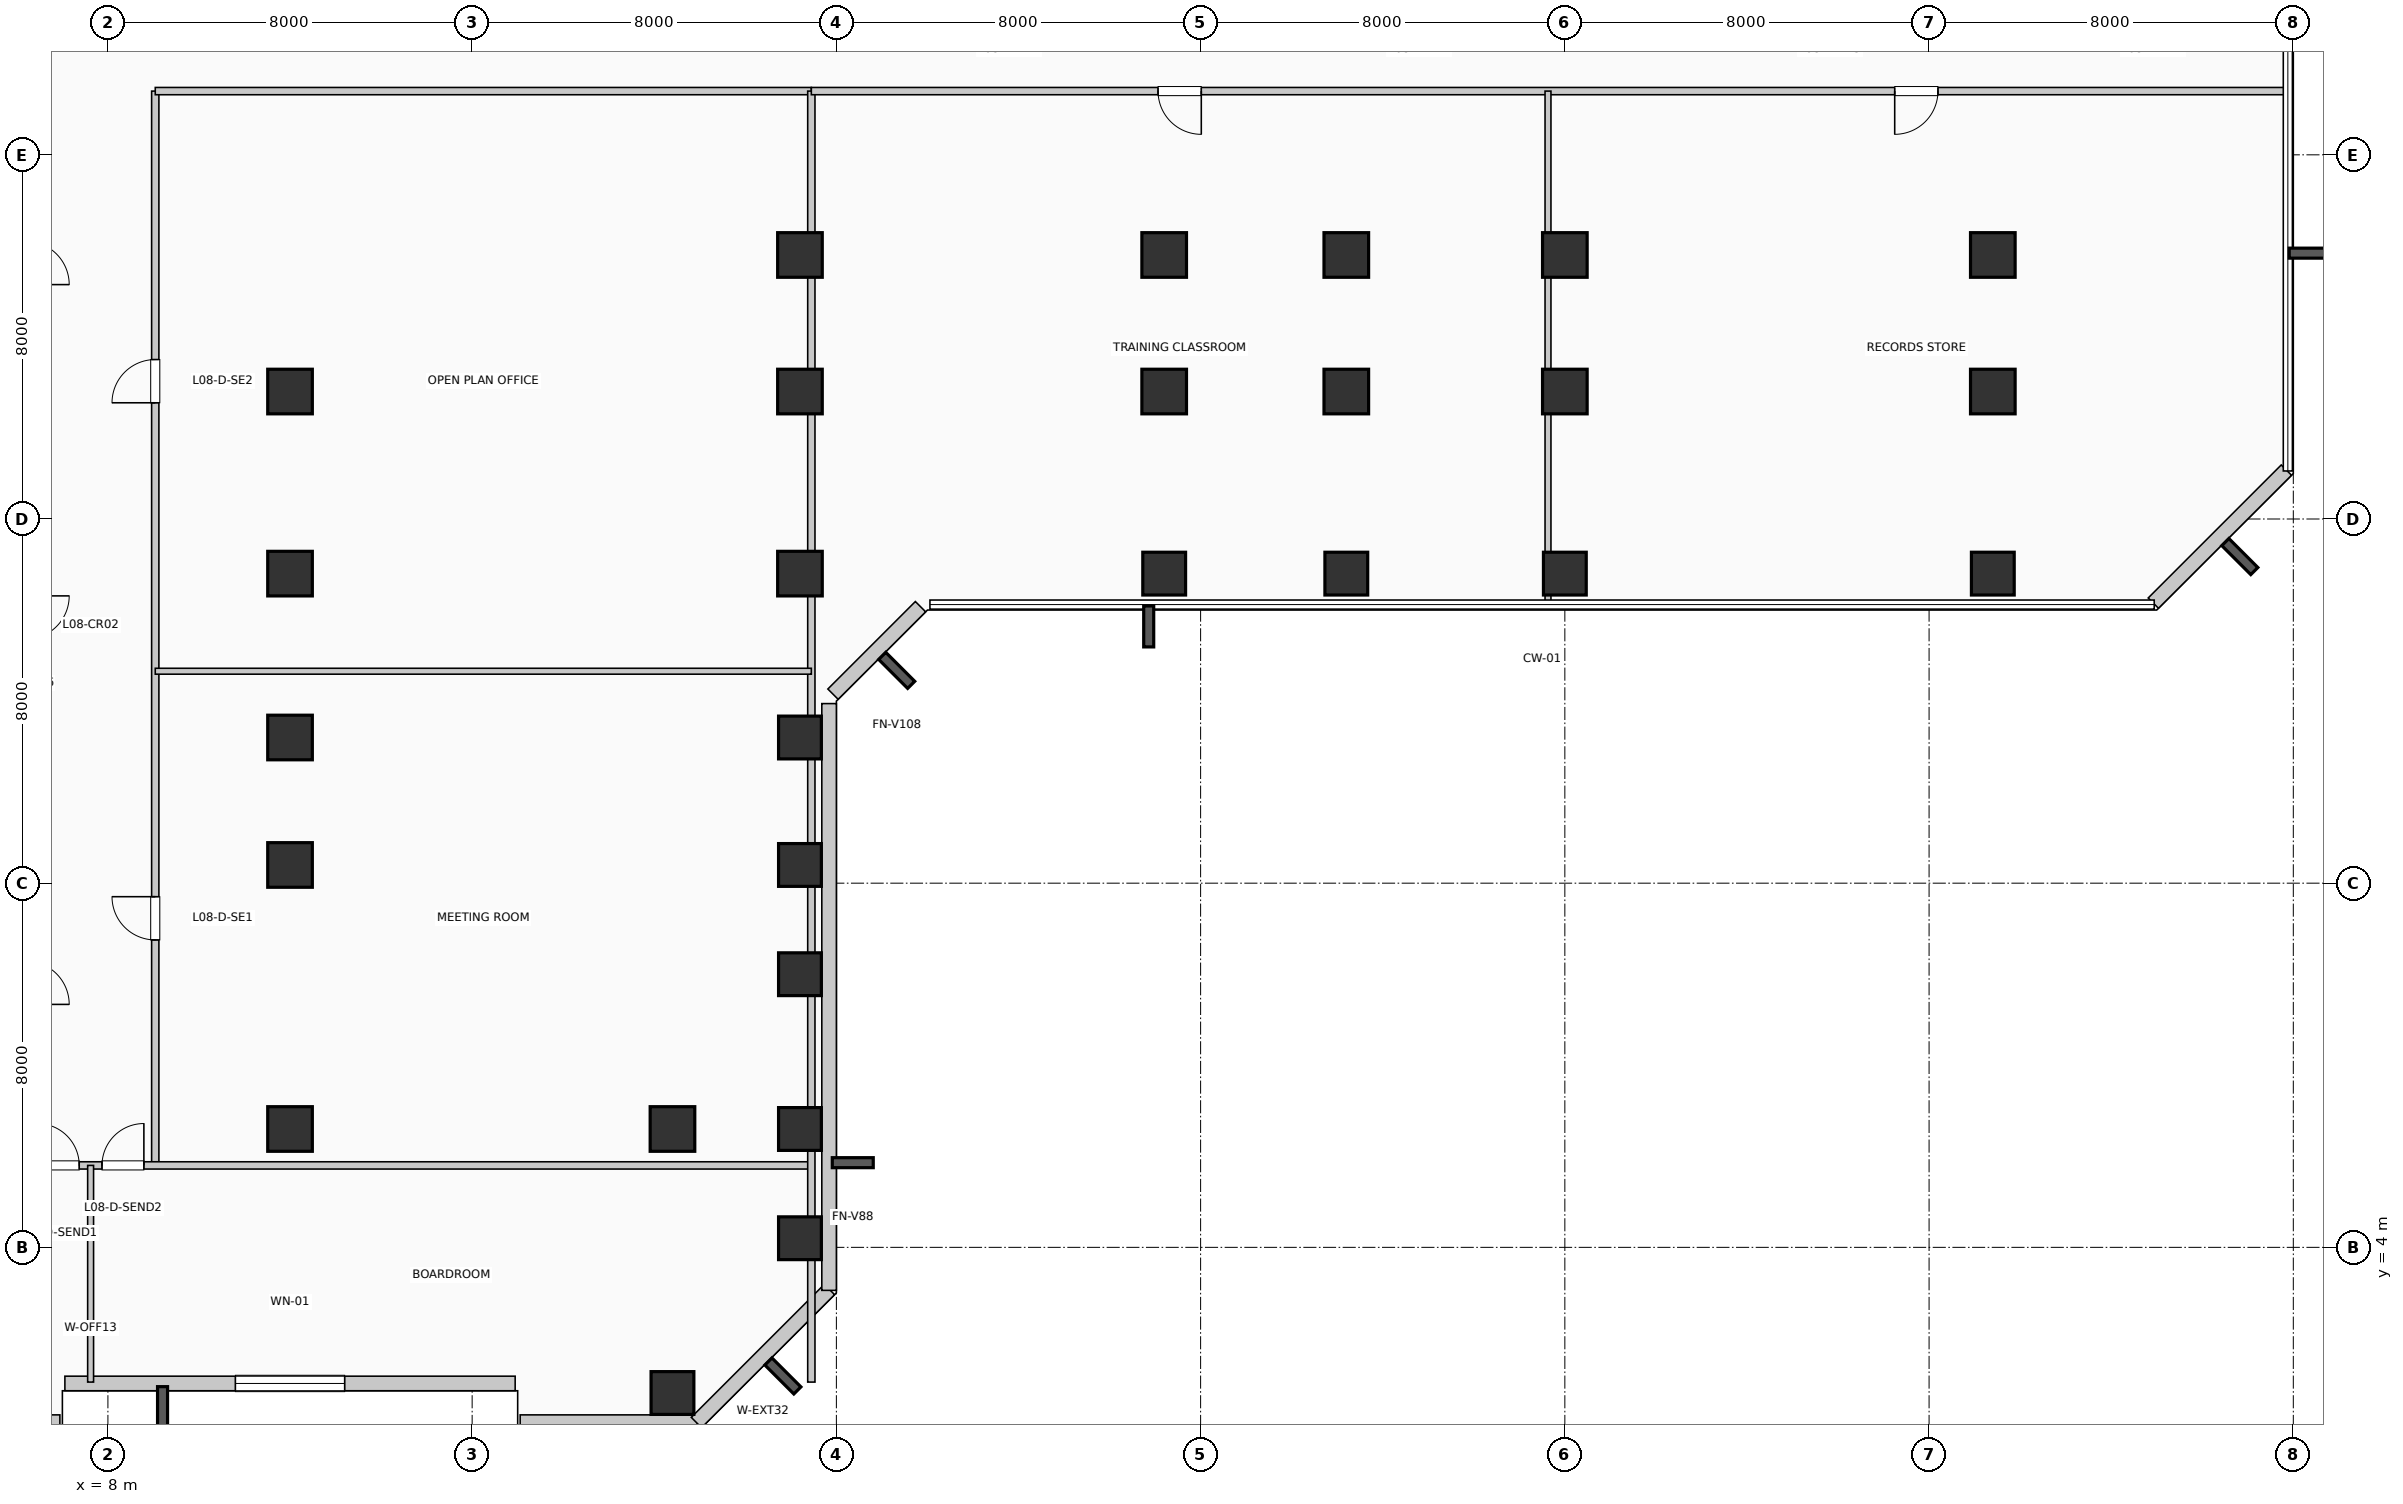
"""IFC4 building model, lengths in metres.
Left out: names, types, materials, properties, quantities, classifications, styles, units other than length and angle.
Written with IfcOpenShell. Run it as: python <this file> out.ifc"""

import sys

from ifc_helpers import new_model, si_unit, direction, frame, frame_2d, origin, origin_2d, place, context, subcontext, project, spatial, rectangle, extrude, element, fill, save


model = new_model("IFC4")
c1 = context("Model", 3, precision=1e-05, world=origin(), true_north=direction((0.0, 1.0)))
c2 = subcontext(c1, "Body", "Model", "MODEL_VIEW")
j1 = project(units=[si_unit("LENGTHUNIT", "METRE"), si_unit("PLANEANGLEUNIT", "RADIAN")], contexts=[c1])
p1 = place(None, origin())
s1 = spatial("IfcSite", under=j1, at=p1, CompositionType="ELEMENT")
p2 = place(p1, origin())
s2 = spatial("IfcBuilding", under=s1, at=p2, CompositionType="ELEMENT")
p3 = place(p2, frame((0.0, 0.0, 38.28)))
s3 = spatial("IfcBuildingStorey", under=s2, at=p3, CompositionType="ELEMENT", Elevation=38.28)
for number, where, z_axis, x_axis in (
    (1, (12.0, 6.6, 0.0), (0.0, 0.0, 1.0), (1.0, 0.0, 0.0)),
    (2, (12.0, 12.4, 0.0), (0.0, 0.0, 1.0), (1.0, 0.0, 0.0)),
    (3, (12.0, 15.2, 0.0), (0.0, 0.0, 1.0), (1.0, 0.0, 0.0)),
    (4, (12.0, 18.8, 0.0), (0.0, 0.0, 1.0), (1.0, 0.0, 0.0)),
    (5, (12.0, 22.8, 0.0), (0.0, 0.0, 1.0), (1.0, 0.0, 0.0)),
):
    element("IfcColumn", number, at=place(p3, frame(where, z_axis=z_axis, x_axis=x_axis)), inside=s3, PredefinedType="COLUMN", context=c2, shape_type="SweptSolid", body=[
        extrude(rectangle(XDim=0.98, YDim=0.98, at=origin_2d()), origin(), (0.0, 0.0, 1.0), 3.96),
    ])
p4 = place(p3, frame((20.4, 0.8, 0.0), z_axis=(0.0, 0.0, 1.0), x_axis=(1.0, 0.0, 0.0)))
e6 = element("IfcColumn", 6, at=p4, inside=s3, PredefinedType="COLUMN", context=c2, shape_type="SweptSolid", body=[
    extrude(rectangle(XDim=0.94, YDim=0.94, at=origin_2d()), origin(), (0.0, 0.0, 1.0), 3.96),
])
p5 = place(p3, frame((20.4, 6.6, 0.0), z_axis=(0.0, 0.0, 1.0), x_axis=(1.0, 0.0, 0.0)))
e7 = element("IfcColumn", 7, at=p5, inside=s3, PredefinedType="COLUMN", context=c2, shape_type="SweptSolid", body=[
    extrude(rectangle(XDim=0.98, YDim=0.98, at=origin_2d()), origin(), (0.0, 0.0, 1.0), 3.96),
])
for number, where, z_axis, x_axis in (
    (8, (23.2, 4.2, 0.0), (0.0, 0.0, 1.0), (1.0, 0.0, 0.0)),
    (9, (23.2, 6.6, 0.0), (0.0, 0.0, 1.0), (1.0, 0.0, 0.0)),
    (10, (23.2, 10.0, 0.0), (0.0, 0.0, 1.0), (1.0, 0.0, 0.0)),
    (11, (23.2, 12.4, 0.0), (0.0, 0.0, 1.0), (1.0, 0.0, 0.0)),
    (12, (23.2, 15.2, 0.0), (0.0, 0.0, 1.0), (1.0, 0.0, 0.0)),
):
    element("IfcColumn", number, at=place(p3, frame(where, z_axis=z_axis, x_axis=x_axis)), inside=s3, PredefinedType="COLUMN", context=c2, shape_type="SweptSolid", body=[
        extrude(rectangle(XDim=0.94, YDim=0.94, at=origin_2d()), origin(), (0.0, 0.0, 1.0), 3.96),
    ])
for number, where, z_axis, x_axis in (
    (13, (23.2, 18.8, 0.0), (0.0, 0.0, 1.0), (1.0, 0.0, 0.0)),
    (14, (23.2, 22.8, 0.0), (0.0, 0.0, 1.0), (1.0, 0.0, 0.0)),
    (15, (23.2, 25.8, 0.0), (0.0, 0.0, 1.0), (1.0, 0.0, 0.0)),
):
    element("IfcColumn", number, at=place(p3, frame(where, z_axis=z_axis, x_axis=x_axis)), inside=s3, PredefinedType="COLUMN", context=c2, shape_type="SweptSolid", body=[
        extrude(rectangle(XDim=0.98, YDim=0.98, at=origin_2d()), origin(), (0.0, 0.0, 1.0), 3.96),
    ])
p6 = place(p3, frame((31.2, 18.8, 0.0), z_axis=(0.0, 0.0, 1.0), x_axis=(1.0, 0.0, 0.0)))
e16 = element("IfcColumn", 16, at=p6, inside=s3, PredefinedType="COLUMN", context=c2, shape_type="SweptSolid", body=[
    extrude(rectangle(XDim=0.94, YDim=0.94, at=origin_2d()), origin(), (0.0, 0.0, 1.0), 3.96),
])
for number, where, z_axis, x_axis in (
    (17, (31.2, 22.8, 0.0), (0.0, 0.0, 1.0), (1.0, 0.0, 0.0)),
    (18, (31.2, 25.8, 0.0), (0.0, 0.0, 1.0), (1.0, 0.0, 0.0)),
):
    element("IfcColumn", number, at=place(p3, frame(where, z_axis=z_axis, x_axis=x_axis)), inside=s3, PredefinedType="COLUMN", context=c2, shape_type="SweptSolid", body=[
        extrude(rectangle(XDim=0.98, YDim=0.98, at=origin_2d()), origin(), (0.0, 0.0, 1.0), 3.96),
    ])
p7 = place(p3, frame((35.2, 18.8, 0.0), z_axis=(0.0, 0.0, 1.0), x_axis=(1.0, 0.0, 0.0)))
e19 = element("IfcColumn", 19, at=p7, inside=s3, PredefinedType="COLUMN", context=c2, shape_type="SweptSolid", body=[
    extrude(rectangle(XDim=0.94, YDim=0.94, at=origin_2d()), origin(), (0.0, 0.0, 1.0), 3.96),
])
for number, where, z_axis, x_axis in (
    (20, (35.2, 22.8, 0.0), (0.0, 0.0, 1.0), (1.0, 0.0, 0.0)),
    (21, (35.2, 25.8, 0.0), (0.0, 0.0, 1.0), (1.0, 0.0, 0.0)),
):
    element("IfcColumn", number, at=place(p3, frame(where, z_axis=z_axis, x_axis=x_axis)), inside=s3, PredefinedType="COLUMN", context=c2, shape_type="SweptSolid", body=[
        extrude(rectangle(XDim=0.98, YDim=0.98, at=origin_2d()), origin(), (0.0, 0.0, 1.0), 3.96),
    ])
p8 = place(p3, frame((40.0, 18.8, 0.0), z_axis=(0.0, 0.0, 1.0), x_axis=(1.0, 0.0, 0.0)))
e22 = element("IfcColumn", 22, at=p8, inside=s3, PredefinedType="COLUMN", context=c2, shape_type="SweptSolid", body=[
    extrude(rectangle(XDim=0.94, YDim=0.94, at=origin_2d()), origin(), (0.0, 0.0, 1.0), 3.96),
])
for number, where, z_axis, x_axis in (
    (23, (40.0, 22.8, 0.0), (0.0, 0.0, 1.0), (1.0, 0.0, 0.0)),
    (24, (40.0, 25.8, 0.0), (0.0, 0.0, 1.0), (1.0, 0.0, 0.0)),
):
    element("IfcColumn", number, at=place(p3, frame(where, z_axis=z_axis, x_axis=x_axis)), inside=s3, PredefinedType="COLUMN", context=c2, shape_type="SweptSolid", body=[
        extrude(rectangle(XDim=0.98, YDim=0.98, at=origin_2d()), origin(), (0.0, 0.0, 1.0), 3.96),
    ])
p9 = place(p3, frame((49.4, 18.8, 0.0), z_axis=(0.0, 0.0, 1.0), x_axis=(1.0, 0.0, 0.0)))
e25 = element("IfcColumn", 25, at=p9, inside=s3, PredefinedType="COLUMN", context=c2, shape_type="SweptSolid", body=[
    extrude(rectangle(XDim=0.94, YDim=0.94, at=origin_2d()), origin(), (0.0, 0.0, 1.0), 3.96),
])
for number, where, z_axis, x_axis in (
    (26, (49.4, 22.8, 0.0), (0.0, 0.0, 1.0), (1.0, 0.0, 0.0)),
    (27, (49.4, 25.8, 0.0), (0.0, 0.0, 1.0), (1.0, 0.0, 0.0)),
):
    element("IfcColumn", number, at=place(p3, frame(where, z_axis=z_axis, x_axis=x_axis)), inside=s3, PredefinedType="COLUMN", context=c2, shape_type="SweptSolid", body=[
        extrude(rectangle(XDim=0.98, YDim=0.98, at=origin_2d()), origin(), (0.0, 0.0, 1.0), 3.96),
    ])
p10 = place(p3, frame((3.055, 0.16, 0.0), z_axis=(0.0, 0.0, 1.0), x_axis=(1.0, 0.0, 0.0)))
e28 = element("IfcWall", 28, at=p10, inside=s3, PredefinedType="SOLIDWALL", context=c2, shape_type="SweptSolid", body=[
    extrude(rectangle(XDim=3.89, YDim=0.32, at=frame_2d((1.945, 0.0))), origin(), (0.0, 0.0, 1.0), 3.71),
])
p11 = place(p3, frame((7.055, 1.01, 0.0), z_axis=(0.0, 0.0, 1.0), x_axis=(1.0, 0.0, 0.0)))
e29 = element("IfcWall", 29, at=p11, inside=s3, PredefinedType="SOLIDWALL", context=c2, shape_type="SweptSolid", body=[
    extrude(rectangle(XDim=9.89, YDim=0.32, at=frame_2d((4.945, 0.0))), origin(), (0.0, 0.0, 1.0), 3.71),
])
p12 = place(p11, frame((3.745, 0.0, 0.85)))
e30 = element("IfcOpeningElement", 30, at=p12, cuts=e29, PredefinedType="OPENING", context=c2, shape_type="SweptSolid", body=[
    extrude(rectangle(XDim=2.4, YDim=2.05, at=frame_2d((1.2, 1.025))), frame((0.0, 0.17, 0.0), z_axis=(0.0, -1.0, 0.0), x_axis=(1.0, 0.0, 0.0)), (0.0, 0.0, 1.0), 0.34),
])
p13 = place(p3, frame((17.055, 0.16, 0.0), z_axis=(0.0, 0.0, 1.0), x_axis=(1.0, 0.0, 0.0)))
e31 = element("IfcWall", 31, at=p13, inside=s3, PredefinedType="SOLIDWALL", context=c2, shape_type="SweptSolid", body=[
    extrude(rectangle(XDim=3.89, YDim=0.32, at=frame_2d((1.945, 0.0))), origin(), (0.0, 0.0, 1.0), 3.71),
])
p14 = place(p3, frame((20.926, 0.152, 0.0), z_axis=(0.0, 0.0, 1.0), x_axis=(0.707106781187, 0.707106781187, 0.0)))
e32 = element("IfcWall", 32, at=p14, inside=s3, PredefinedType="SOLIDWALL", context=c2, shape_type="SweptSolid", body=[
    extrude(rectangle(XDim=4.133, YDim=0.32, at=frame_2d((2.066, 0.0))), origin(), (0.0, 0.0, 1.0), 3.71),
])
p15 = place(p3, frame((23.84, 3.055, 0.0), z_axis=(0.0, 0.0, 1.0), x_axis=(0.0, 1.0, 0.0)))
e33 = element("IfcWall", 33, at=p15, inside=s3, PredefinedType="SOLIDWALL", context=c2, shape_type="SweptSolid", body=[
    extrude(rectangle(XDim=12.89, YDim=0.32, at=frame_2d((6.445, 0.0))), origin(), (0.0, 0.0, 1.0), 3.71),
])
p16 = place(p3, frame((23.926, 16.152, 0.0), z_axis=(0.0, 0.0, 1.0), x_axis=(0.707106781187, 0.707106781187, 0.0)))
e34 = element("IfcWall", 34, at=p16, inside=s3, PredefinedType="SOLIDWALL", context=c2, shape_type="SweptSolid", body=[
    extrude(rectangle(XDim=2.718, YDim=0.32, at=frame_2d((1.359, 0.0))), origin(), (0.0, 0.0, 1.0), 3.71),
])
p17 = place(p3, frame((52.926, 18.152, 0.0), z_axis=(0.0, 0.0, 1.0), x_axis=(0.707106781187, 0.707106781187, 0.0)))
e35 = element("IfcWall", 35, at=p17, inside=s3, PredefinedType="SOLIDWALL", context=c2, shape_type="SweptSolid", body=[
    extrude(rectangle(XDim=4.133, YDim=0.32, at=frame_2d((2.066, 0.0))), origin(), (0.0, 0.0, 1.0), 3.71),
])
p18 = place(p3, frame((9.04, 5.8, 0.0), z_axis=(0.0, 0.0, 1.0), x_axis=(0.0, 1.0, 0.0)))
e36 = element("IfcWall", 36, at=p18, inside=s3, PredefinedType="PARTITIONING", context=c2, shape_type="SweptSolid", body=[
    extrude(rectangle(XDim=23.6, YDim=0.16, at=frame_2d((11.8, 0.0))), origin(), (0.0, 0.0, 1.0), 3.71),
])
p19 = place(p18, frame((4.953, 0.0, 0.0)))
e37 = element("IfcOpeningElement", 37, at=p19, cuts=e36, PredefinedType="OPENING", context=c2, shape_type="SweptSolid", body=[
    extrude(rectangle(XDim=0.95, YDim=2.15, at=frame_2d((0.475, 1.075))), frame((0.0, 0.09, 0.0), z_axis=(0.0, -1.0, 0.0), x_axis=(1.0, 0.0, 0.0)), (0.0, 0.0, 1.0), 0.18),
])
p20 = place(p18, frame((16.753, 0.0, 0.0)))
e38 = element("IfcOpeningElement", 38, at=p20, cuts=e36, PredefinedType="OPENING", context=c2, shape_type="SweptSolid", body=[
    extrude(rectangle(XDim=0.95, YDim=2.15, at=frame_2d((0.475, 1.075))), frame((0.0, 0.09, 0.0), z_axis=(0.0, -1.0, 0.0), x_axis=(1.0, 0.0, 0.0)), (0.0, 0.0, 1.0), 0.18),
])
p21 = place(p3, frame((0.19, 5.8, 0.0), z_axis=(0.0, 0.0, 1.0), x_axis=(1.0, 0.0, 0.0)))
e39 = element("IfcWall", 39, at=p21, inside=s3, PredefinedType="PARTITIONING", context=c2, shape_type="SweptSolid", body=[
    extrude(rectangle(XDim=23.26, YDim=0.16, at=frame_2d((11.63, 0.0))), origin(), (0.0, 0.0, 1.0), 3.71),
])
p22 = place(p21, frame((6.26, 0.0, 0.0)))
e40 = element("IfcOpeningElement", 40, at=p22, cuts=e39, PredefinedType="OPENING", context=c2, shape_type="SweptSolid", body=[
    extrude(rectangle(XDim=0.92, YDim=2.1, at=frame_2d((0.46, 1.05))), frame((0.0, 0.09, 0.0), z_axis=(0.0, -1.0, 0.0), x_axis=(1.0, 0.0, 0.0)), (0.0, 0.0, 1.0), 0.18),
])
p23 = place(p21, frame((7.68, 0.0, 0.0)))
e41 = element("IfcOpeningElement", 41, at=p23, cuts=e39, PredefinedType="OPENING", context=c2, shape_type="SweptSolid", body=[
    extrude(rectangle(XDim=0.92, YDim=2.1, at=frame_2d((0.46, 1.05))), frame((0.0, 0.09, 0.0), z_axis=(0.0, -1.0, 0.0), x_axis=(1.0, 0.0, 0.0)), (0.0, 0.0, 1.0), 0.18),
])
p24 = place(p3, frame((9.04, 29.4, 0.0), z_axis=(0.0, 0.0, 1.0), x_axis=(1.0, 0.0, 0.0)))
e42 = element("IfcWall", 42, at=p24, inside=s3, PredefinedType="PARTITIONING", context=c2, shape_type="SweptSolid", body=[
    extrude(rectangle(XDim=14.41, YDim=0.16, at=frame_2d((7.205, 0.0))), origin(), (0.0, 0.0, 1.0), 3.365),
])
p25 = place(p3, frame((23.45, 1.04, 0.0), z_axis=(0.0, 0.0, 1.0), x_axis=(0.0, 1.0, 0.0)))
e43 = element("IfcWall", 43, at=p25, inside=s3, PredefinedType="PARTITIONING", context=c2, shape_type="SweptSolid", body=[
    extrude(rectangle(XDim=28.36, YDim=0.16, at=frame_2d((14.18, 0.0))), origin(), (0.0, 0.0, 1.0), 2.995),
])
p26 = place(p3, frame((7.62, 1.04, 0.0), z_axis=(0.0, 0.0, 1.0), x_axis=(0.0, 1.0, 0.0)))
e44 = element("IfcWall", 44, at=p26, inside=s3, PredefinedType="PARTITIONING", context=c2, shape_type="SweptSolid", body=[
    extrude(rectangle(XDim=4.76, YDim=0.13, at=frame_2d((2.38, 0.0))), origin(), (0.0, 0.0, 1.0), 3.71),
])
p27 = place(p3, frame((9.04, 16.656, 0.0), z_axis=(0.0, 0.0, 1.0), x_axis=(1.0, 0.0, 0.0)))
e45 = element("IfcWall", 45, at=p27, inside=s3, PredefinedType="PARTITIONING", context=c2, shape_type="SweptSolid", body=[
    extrude(rectangle(XDim=14.41, YDim=0.13, at=frame_2d((7.205, 0.0))), origin(), (0.0, 0.0, 1.0), 3.71),
])
p28 = place(p3, frame((23.45, 29.4, 0.0), z_axis=(0.0, 0.0, 1.0), x_axis=(1.0, 0.0, 0.0)))
e46 = element("IfcWall", 46, at=p28, inside=s3, PredefinedType="PARTITIONING", context=c2, shape_type="SweptSolid", body=[
    extrude(rectangle(XDim=32.36, YDim=0.16, at=frame_2d((16.18, 0.0))), origin(), (0.0, 0.0, 1.0), 3.365),
])
p29 = place(p28, frame((8.565, 0.0, 0.0), z_axis=(0.0, 0.0, 1.0), x_axis=(-1.0, 0.0, 0.0)))
e47 = element("IfcOpeningElement", 47, at=p29, cuts=e46, PredefinedType="OPENING", context=c2, shape_type="SweptSolid", body=[
    extrude(rectangle(XDim=0.95, YDim=2.15, at=frame_2d((0.475, 1.075))), frame((0.0, 0.09, 0.0), z_axis=(0.0, -1.0, 0.0), x_axis=(1.0, 0.0, 0.0)), (0.0, 0.0, 1.0), 0.18),
])
p30 = place(p28, frame((24.745, 0.0, 0.0), z_axis=(0.0, 0.0, 1.0), x_axis=(-1.0, 0.0, 0.0)))
e48 = element("IfcOpeningElement", 48, at=p30, cuts=e46, PredefinedType="OPENING", context=c2, shape_type="SweptSolid", body=[
    extrude(rectangle(XDim=0.95, YDim=2.15, at=frame_2d((0.475, 1.075))), frame((0.0, 0.09, 0.0), z_axis=(0.0, -1.0, 0.0), x_axis=(1.0, 0.0, 0.0)), (0.0, 0.0, 1.0), 0.18),
])
p31 = place(p3, frame((39.63, 18.19, 0.0), z_axis=(0.0, 0.0, 1.0), x_axis=(0.0, 1.0, 0.0)))
e49 = element("IfcWall", 49, at=p31, inside=s3, PredefinedType="PARTITIONING", context=c2, shape_type="SweptSolid", body=[
    extrude(rectangle(XDim=11.21, YDim=0.13, at=frame_2d((5.605, 0.0))), origin(), (0.0, 0.0, 1.0), 2.995),
])
p32 = place(p12, origin())
e50 = element("IfcWindow", 50, at=p32, inside=s3, PartitioningType="SINGLE_PANEL", PredefinedType="WINDOW", context=c2, shape_type="SweptSolid", body=[
    extrude(rectangle(XDim=2.4, YDim=2.05, at=frame_2d((1.2, 1.025))), frame((0.0, 0.03, 0.0), z_axis=(0.0, -1.0, 0.0), x_axis=(1.0, 0.0, 0.0)), (0.0, 0.0, 1.0), 0.06),
])
fill(e30, e50)
p33 = place(p22, origin())
e51 = element("IfcDoor", 51, at=p33, inside=s3, OperationType="SINGLE_SWING_LEFT", PredefinedType="DOOR", context=c2, shape_type="SweptSolid", body=[
    extrude(rectangle(XDim=0.92, YDim=2.1, at=frame_2d((0.46, 1.05))), frame((0.0, 0.025, 0.0), z_axis=(0.0, -1.0, 0.0), x_axis=(1.0, 0.0, 0.0)), (0.0, 0.0, 1.0), 0.05),
])
fill(e40, e51)
p34 = place(p23, origin())
e52 = element("IfcDoor", 52, at=p34, inside=s3, OperationType="SINGLE_SWING_RIGHT", PredefinedType="DOOR", context=c2, shape_type="SweptSolid", body=[
    extrude(rectangle(XDim=0.92, YDim=2.1, at=frame_2d((0.46, 1.05))), frame((0.0, 0.025, 0.0), z_axis=(0.0, -1.0, 0.0), x_axis=(1.0, 0.0, 0.0)), (0.0, 0.0, 1.0), 0.05),
])
fill(e41, e52)
p35 = place(p19, origin())
e53 = element("IfcDoor", 53, at=p35, inside=s3, OperationType="SINGLE_SWING_RIGHT", PredefinedType="DOOR", context=c2, shape_type="SweptSolid", body=[
    extrude(rectangle(XDim=0.95, YDim=2.15, at=frame_2d((0.475, 1.075))), frame((0.0, 0.025, 0.0), z_axis=(0.0, -1.0, 0.0), x_axis=(1.0, 0.0, 0.0)), (0.0, 0.0, 1.0), 0.05),
])
fill(e37, e53)
p36 = place(p20, origin())
e54 = element("IfcDoor", 54, at=p36, inside=s3, OperationType="SINGLE_SWING_LEFT", PredefinedType="DOOR", context=c2, shape_type="SweptSolid", body=[
    extrude(rectangle(XDim=0.95, YDim=2.15, at=frame_2d((0.475, 1.075))), frame((0.0, 0.025, 0.0), z_axis=(0.0, -1.0, 0.0), x_axis=(1.0, 0.0, 0.0)), (0.0, 0.0, 1.0), 0.05),
])
fill(e38, e54)
p37 = place(p29, origin())
e55 = element("IfcDoor", 55, at=p37, inside=s3, OperationType="SINGLE_SWING_RIGHT", PredefinedType="DOOR", context=c2, shape_type="SweptSolid", body=[
    extrude(rectangle(XDim=0.95, YDim=2.15, at=frame_2d((0.475, 1.075))), frame((0.0, 0.025, 0.0), z_axis=(0.0, -1.0, 0.0), x_axis=(1.0, 0.0, 0.0)), (0.0, 0.0, 1.0), 0.05),
])
fill(e47, e55)
p38 = place(p30, origin())
e56 = element("IfcDoor", 56, at=p38, inside=s3, OperationType="SINGLE_SWING_LEFT", PredefinedType="DOOR", context=c2, shape_type="SweptSolid", body=[
    extrude(rectangle(XDim=0.95, YDim=2.15, at=frame_2d((0.475, 1.075))), frame((0.0, 0.025, 0.0), z_axis=(0.0, -1.0, 0.0), x_axis=(1.0, 0.0, 0.0)), (0.0, 0.0, 1.0), 0.05),
])
fill(e48, e56)
save(model, sys.argv[1])
